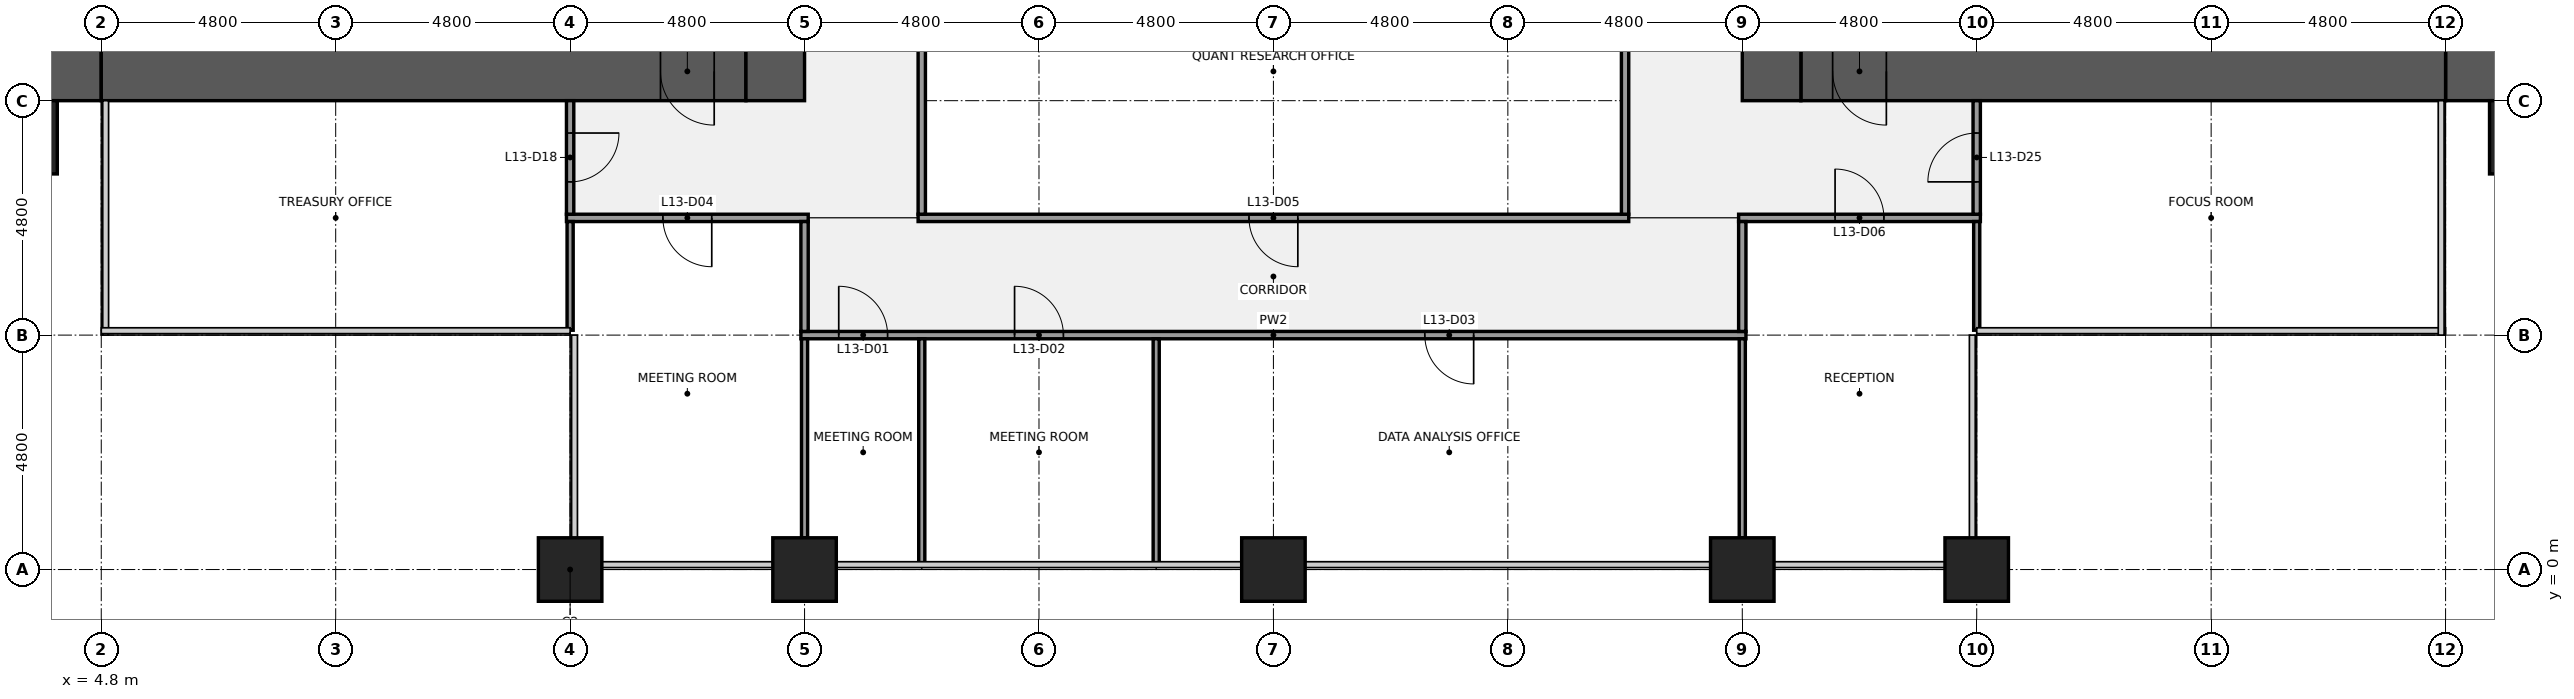
"""IFC4 building model, lengths in metres.
Left out: names, types, materials, properties, quantities, classifications, styles, units other than length and angle.
Written with IfcOpenShell. Run it as: python <this file> out.ifc"""

import sys

from ifc_helpers import new_model, si_unit, direction, frame, frame_2d, origin, origin_2d, place, context, subcontext, project, spatial, rectangle, extrude, element, fill, save


model = new_model("IFC4")
c1 = context("Model", 3, precision=1e-05, world=origin(), true_north=direction((0.0, 1.0)))
c2 = subcontext(c1, "Body", "Model", "MODEL_VIEW")
j1 = project(units=[si_unit("LENGTHUNIT", "METRE"), si_unit("PLANEANGLEUNIT", "RADIAN")], contexts=[c1])
p1 = place(None, origin())
s1 = spatial("IfcSite", under=j1, at=p1, CompositionType="ELEMENT")
p2 = place(p1, origin())
s2 = spatial("IfcBuilding", under=s1, at=p2, CompositionType="ELEMENT")
p3 = place(p2, frame((0.0, 0.0, 63.0)))
s3 = spatial("IfcBuildingStorey", under=s2, at=p3, CompositionType="ELEMENT", Elevation=63.0)
for number, where, z_axis, x_axis in (
    (1, (14.4, 0.0, 0.0), (0.0, 0.0, 1.0), (1.0, 0.0, 0.0)),
    (2, (19.2, 0.0, 0.0), (0.0, 0.0, 1.0), (1.0, 0.0, 0.0)),
    (3, (28.8, 0.0, 0.0), (0.0, 0.0, 1.0), (1.0, 0.0, 0.0)),
    (4, (38.4, 0.0, 0.0), (0.0, 0.0, 1.0), (1.0, 0.0, 0.0)),
    (5, (43.2, 0.0, 0.0), (0.0, 0.0, 1.0), (1.0, 0.0, 0.0)),
):
    element("IfcColumn", number, at=place(p3, frame(where, z_axis=z_axis, x_axis=x_axis)), inside=s3, PredefinedType="COLUMN", context=c2, shape_type="SweptSolid", body=[
        extrude(rectangle(XDim=1.3, YDim=1.3, at=origin_2d()), origin(), (0.0, 0.0, 1.0), 4.0),
    ])
p4 = place(p3, frame((4.8, 10.2, 0.0), z_axis=(0.0, 0.0, 1.0), x_axis=(-1.0, 0.0, 0.0)))
e6 = element("IfcWall", 6, at=p4, inside=s3, PredefinedType="SHEAR", context=c2, shape_type="SweptSolid", body=[
    extrude(rectangle(XDim=3.6, YDim=1.2, at=frame_2d((1.8, 0.0))), origin(), (0.0, 0.0, 1.0), 3.84),
])
p5 = place(p3, frame((18.0, 10.2, 0.0), z_axis=(0.0, 0.0, 1.0), x_axis=(-1.0, 0.0, 0.0)))
e7 = element("IfcWall", 7, at=p5, inside=s3, PredefinedType="SHEAR", context=c2, shape_type="SweptSolid", body=[
    extrude(rectangle(XDim=13.2, YDim=1.2, at=frame_2d((6.6, 0.0))), origin(), (0.0, 0.0, 1.0), 3.84),
])
p6 = place(p5, frame((0.65, 0.0, 0.0)))
e8 = element("IfcOpeningElement", 8, at=p6, cuts=e7, PredefinedType="OPENING", context=c2, shape_type="SweptSolid", body=[
    extrude(rectangle(XDim=1.1, YDim=2.1, at=frame_2d((0.55, 1.05))), frame((0.0, 0.61, 0.0), z_axis=(0.0, -1.0, 0.0), x_axis=(1.0, 0.0, 0.0)), (0.0, 0.0, 1.0), 1.22),
])
p7 = place(p3, frame((18.6, 38.4, 0.0), z_axis=(0.0, 0.0, 1.0), x_axis=(0.0, -1.0, 0.0)))
e9 = element("IfcWall", 9, at=p7, inside=s3, PredefinedType="SHEAR", context=c2, shape_type="SweptSolid", body=[
    extrude(rectangle(XDim=28.8, YDim=1.2, at=frame_2d((14.4, 0.0))), origin(), (0.0, 0.0, 1.0), 3.84),
])
p8 = place(p7, frame((18.3, 0.0, 0.0)))
e10 = element("IfcOpeningElement", 10, at=p8, cuts=e9, PredefinedType="OPENING", context=c2, shape_type="SweptSolid", body=[
    extrude(rectangle(XDim=1.8, YDim=2.1, at=frame_2d((0.9, 1.05))), frame((0.0, 0.61, 0.0), z_axis=(0.0, -1.0, 0.0), x_axis=(1.0, 0.0, 0.0)), (0.0, 0.0, 1.0), 1.22),
])
p9 = place(p7, frame((8.7, 0.0, 0.0)))
e11 = element("IfcOpeningElement", 11, at=p9, cuts=e9, PredefinedType="OPENING", context=c2, shape_type="SweptSolid", body=[
    extrude(rectangle(XDim=1.8, YDim=2.1, at=frame_2d((0.9, 1.05))), frame((0.0, 0.61, 0.0), z_axis=(0.0, -1.0, 0.0), x_axis=(1.0, 0.0, 0.0)), (0.0, 0.0, 1.0), 1.22),
])
p10 = place(p3, frame((56.4, 10.2, 0.0), z_axis=(0.0, 0.0, 1.0), x_axis=(-1.0, 0.0, 0.0)))
e12 = element("IfcWall", 12, at=p10, inside=s3, PredefinedType="SHEAR", context=c2, shape_type="SweptSolid", body=[
    extrude(rectangle(XDim=3.6, YDim=1.2, at=frame_2d((1.8, 0.0))), origin(), (0.0, 0.0, 1.0), 3.84),
])
p11 = place(p3, frame((52.8, 10.2, 0.0), z_axis=(0.0, 0.0, 1.0), x_axis=(-1.0, 0.0, 0.0)))
e13 = element("IfcWall", 13, at=p11, inside=s3, PredefinedType="SHEAR", context=c2, shape_type="SweptSolid", body=[
    extrude(rectangle(XDim=13.2, YDim=1.2, at=frame_2d((6.6, 0.0))), origin(), (0.0, 0.0, 1.0), 3.84),
])
p12 = place(p11, frame((11.45, 0.0, 0.0)))
e14 = element("IfcOpeningElement", 14, at=p12, cuts=e13, PredefinedType="OPENING", context=c2, shape_type="SweptSolid", body=[
    extrude(rectangle(XDim=1.1, YDim=2.1, at=frame_2d((0.55, 1.05))), frame((0.0, 0.61, 0.0), z_axis=(0.0, -1.0, 0.0), x_axis=(1.0, 0.0, 0.0)), (0.0, 0.0, 1.0), 1.22),
])
p13 = place(p3, frame((39.0, 9.6, 0.0), z_axis=(0.0, 0.0, 1.0), x_axis=(0.0, 1.0, 0.0)))
e15 = element("IfcWall", 15, at=p13, inside=s3, PredefinedType="SHEAR", context=c2, shape_type="SweptSolid", body=[
    extrude(rectangle(XDim=28.8, YDim=1.2, at=frame_2d((14.4, 0.0))), origin(), (0.0, 0.0, 1.0), 3.84),
])
p14 = place(p13, frame((8.7, 0.0, 0.0)))
e16 = element("IfcOpeningElement", 16, at=p14, cuts=e15, PredefinedType="OPENING", context=c2, shape_type="SweptSolid", body=[
    extrude(rectangle(XDim=1.8, YDim=2.1, at=frame_2d((0.9, 1.05))), frame((0.0, 0.61, 0.0), z_axis=(0.0, -1.0, 0.0), x_axis=(1.0, 0.0, 0.0)), (0.0, 0.0, 1.0), 1.22),
])
p15 = place(p13, frame((18.3, 0.0, 0.0)))
e17 = element("IfcOpeningElement", 17, at=p15, cuts=e15, PredefinedType="OPENING", context=c2, shape_type="SweptSolid", body=[
    extrude(rectangle(XDim=1.8, YDim=2.1, at=frame_2d((0.9, 1.05))), frame((0.0, 0.61, 0.0), z_axis=(0.0, -1.0, 0.0), x_axis=(1.0, 0.0, 0.0)), (0.0, 0.0, 1.0), 1.22),
])
p16 = place(p3, frame((19.125, 4.8, 0.0), z_axis=(0.0, 0.0, 1.0), x_axis=(1.0, 0.0, 0.0)))
e18 = element("IfcWall", 18, at=p16, inside=s3, PredefinedType="PARTITIONING", context=c2, shape_type="SweptSolid", body=[
    extrude(rectangle(XDim=19.35, YDim=0.15, at=frame_2d((9.675, 0.0))), origin(), (0.0, 0.0, 1.0), 2.87),
])
p17 = place(p16, frame((0.775, 0.0, 0.0)))
e19 = element("IfcOpeningElement", 19, at=p17, cuts=e18, PredefinedType="OPENING", context=c2, shape_type="SweptSolid", body=[
    extrude(rectangle(XDim=1.0, YDim=2.1, at=frame_2d((0.5, 1.05))), frame((0.0, 0.085, 0.0), z_axis=(0.0, -1.0, 0.0), x_axis=(1.0, 0.0, 0.0)), (0.0, 0.0, 1.0), 0.17),
])
p18 = place(p16, frame((4.375, 0.0, 0.0)))
e20 = element("IfcOpeningElement", 20, at=p18, cuts=e18, PredefinedType="OPENING", context=c2, shape_type="SweptSolid", body=[
    extrude(rectangle(XDim=1.0, YDim=2.1, at=frame_2d((0.5, 1.05))), frame((0.0, 0.085, 0.0), z_axis=(0.0, -1.0, 0.0), x_axis=(1.0, 0.0, 0.0)), (0.0, 0.0, 1.0), 0.17),
])
p19 = place(p16, frame((12.775, 0.0, 0.0)))
e21 = element("IfcOpeningElement", 21, at=p19, cuts=e18, PredefinedType="OPENING", context=c2, shape_type="SweptSolid", body=[
    extrude(rectangle(XDim=1.0, YDim=2.1, at=frame_2d((0.5, 1.05))), frame((0.0, 0.085, 0.0), z_axis=(0.0, -1.0, 0.0), x_axis=(1.0, 0.0, 0.0)), (0.0, 0.0, 1.0), 0.17),
])
p20 = place(p3, frame((14.325, 7.2, 0.0), z_axis=(0.0, 0.0, 1.0), x_axis=(1.0, 0.0, 0.0)))
e22 = element("IfcWall", 22, at=p20, inside=s3, PredefinedType="PARTITIONING", context=c2, shape_type="SweptSolid", body=[
    extrude(rectangle(XDim=4.95, YDim=0.15, at=frame_2d((2.475, 0.0))), origin(), (0.0, 0.0, 1.0), 2.87),
])
p21 = place(p20, frame((1.975, 0.0, 0.0)))
e23 = element("IfcOpeningElement", 23, at=p21, cuts=e22, PredefinedType="OPENING", context=c2, shape_type="SweptSolid", body=[
    extrude(rectangle(XDim=1.0, YDim=2.1, at=frame_2d((0.5, 1.05))), frame((0.0, 0.085, 0.0), z_axis=(0.0, -1.0, 0.0), x_axis=(1.0, 0.0, 0.0)), (0.0, 0.0, 1.0), 0.17),
])
p22 = place(p3, frame((21.525, 7.2, 0.0), z_axis=(0.0, 0.0, 1.0), x_axis=(1.0, 0.0, 0.0)))
e24 = element("IfcWall", 24, at=p22, inside=s3, PredefinedType="PARTITIONING", context=c2, shape_type="SweptSolid", body=[
    extrude(rectangle(XDim=14.55, YDim=0.15, at=frame_2d((7.275, 0.0))), origin(), (0.0, 0.0, 1.0), 2.87),
])
p23 = place(p22, frame((6.775, 0.0, 0.0)))
e25 = element("IfcOpeningElement", 25, at=p23, cuts=e24, PredefinedType="OPENING", context=c2, shape_type="SweptSolid", body=[
    extrude(rectangle(XDim=1.0, YDim=2.1, at=frame_2d((0.5, 1.05))), frame((0.0, 0.085, 0.0), z_axis=(0.0, -1.0, 0.0), x_axis=(1.0, 0.0, 0.0)), (0.0, 0.0, 1.0), 0.17),
])
p24 = place(p3, frame((38.325, 7.2, 0.0), z_axis=(0.0, 0.0, 1.0), x_axis=(1.0, 0.0, 0.0)))
e26 = element("IfcWall", 26, at=p24, inside=s3, PredefinedType="PARTITIONING", context=c2, shape_type="SweptSolid", body=[
    extrude(rectangle(XDim=4.95, YDim=0.15, at=frame_2d((2.475, 0.0))), origin(), (0.0, 0.0, 1.0), 2.87),
])
p25 = place(p24, frame((1.975, 0.0, 0.0)))
e27 = element("IfcOpeningElement", 27, at=p25, cuts=e26, PredefinedType="OPENING", context=c2, shape_type="SweptSolid", body=[
    extrude(rectangle(XDim=1.0, YDim=2.1, at=frame_2d((0.5, 1.05))), frame((0.0, 0.085, 0.0), z_axis=(0.0, -1.0, 0.0), x_axis=(1.0, 0.0, 0.0)), (0.0, 0.0, 1.0), 0.17),
])
p26 = place(p3, frame((14.4, 4.9, 0.0), z_axis=(0.0, 0.0, 1.0), x_axis=(0.0, 1.0, 0.0)))
e28 = element("IfcWall", 28, at=p26, inside=s3, PredefinedType="PARTITIONING", context=c2, shape_type="SweptSolid", body=[
    extrude(rectangle(XDim=2.225, YDim=0.125, at=frame_2d((1.113, 0.0))), origin(), (0.0, 0.0, 1.0), 2.87),
])
p27 = place(p3, frame((14.4, 7.275, 0.0), z_axis=(0.0, 0.0, 1.0), x_axis=(0.0, 1.0, 0.0)))
e29 = element("IfcWall", 29, at=p27, inside=s3, PredefinedType="PARTITIONING", context=c2, shape_type="SweptSolid", body=[
    extrude(rectangle(XDim=2.325, YDim=0.15, at=frame_2d((1.163, 0.0))), origin(), (0.0, 0.0, 1.0), 2.87),
])
p28 = place(p27, frame((0.663, 0.0, 0.0)))
e30 = element("IfcOpeningElement", 30, at=p28, cuts=e29, PredefinedType="OPENING", context=c2, shape_type="SweptSolid", body=[
    extrude(rectangle(XDim=1.0, YDim=2.1, at=frame_2d((0.5, 1.05))), frame((0.0, 0.085, 0.0), z_axis=(0.0, -1.0, 0.0), x_axis=(1.0, 0.0, 0.0)), (0.0, 0.0, 1.0), 0.17),
])
p29 = place(p3, frame((19.2, 0.65, 0.0), z_axis=(0.0, 0.0, 1.0), x_axis=(0.0, 1.0, 0.0)))
e31 = element("IfcWall", 31, at=p29, inside=s3, PredefinedType="PARTITIONING", context=c2, shape_type="SweptSolid", body=[
    extrude(rectangle(XDim=4.075, YDim=0.125, at=frame_2d((2.038, 0.0))), origin(), (0.0, 0.0, 1.0), 2.87),
])
p30 = place(p3, frame((19.2, 4.875, 0.0), z_axis=(0.0, 0.0, 1.0), x_axis=(0.0, 1.0, 0.0)))
e32 = element("IfcWall", 32, at=p30, inside=s3, PredefinedType="PARTITIONING", context=c2, shape_type="SweptSolid", body=[
    extrude(rectangle(XDim=2.25, YDim=0.15, at=frame_2d((1.125, 0.0))), origin(), (0.0, 0.0, 1.0), 2.87),
])
p31 = place(p3, frame((21.6, 0.1, 0.0), z_axis=(0.0, 0.0, 1.0), x_axis=(0.0, 1.0, 0.0)))
e33 = element("IfcWall", 33, at=p31, inside=s3, PredefinedType="PARTITIONING", context=c2, shape_type="SweptSolid", body=[
    extrude(rectangle(XDim=4.625, YDim=0.125, at=frame_2d((2.312, 0.0))), origin(), (0.0, 0.0, 1.0), 2.87),
])
p32 = place(p3, frame((21.6, 7.275, 0.0), z_axis=(0.0, 0.0, 1.0), x_axis=(0.0, 1.0, 0.0)))
e34 = element("IfcWall", 34, at=p32, inside=s3, PredefinedType="PARTITIONING", context=c2, shape_type="SweptSolid", body=[
    extrude(rectangle(XDim=5.863, YDim=0.15, at=frame_2d((2.931, 0.0))), origin(), (0.0, 0.0, 1.0), 2.87),
])
p33 = place(p3, frame((26.4, 0.1, 0.0), z_axis=(0.0, 0.0, 1.0), x_axis=(0.0, 1.0, 0.0)))
e35 = element("IfcWall", 35, at=p33, inside=s3, PredefinedType="PARTITIONING", context=c2, shape_type="SweptSolid", body=[
    extrude(rectangle(XDim=4.625, YDim=0.125, at=frame_2d((2.312, 0.0))), origin(), (0.0, 0.0, 1.0), 2.87),
])
p34 = place(p3, frame((36.0, 7.275, 0.0), z_axis=(0.0, 0.0, 1.0), x_axis=(0.0, 1.0, 0.0)))
e36 = element("IfcWall", 36, at=p34, inside=s3, PredefinedType="PARTITIONING", context=c2, shape_type="SweptSolid", body=[
    extrude(rectangle(XDim=5.863, YDim=0.15, at=frame_2d((2.931, 0.0))), origin(), (0.0, 0.0, 1.0), 2.87),
])
p35 = place(p3, frame((38.4, 0.65, 0.0), z_axis=(0.0, 0.0, 1.0), x_axis=(0.0, 1.0, 0.0)))
e37 = element("IfcWall", 37, at=p35, inside=s3, PredefinedType="PARTITIONING", context=c2, shape_type="SweptSolid", body=[
    extrude(rectangle(XDim=4.075, YDim=0.125, at=frame_2d((2.038, 0.0))), origin(), (0.0, 0.0, 1.0), 2.87),
])
p36 = place(p3, frame((38.4, 4.875, 0.0), z_axis=(0.0, 0.0, 1.0), x_axis=(0.0, 1.0, 0.0)))
e38 = element("IfcWall", 38, at=p36, inside=s3, PredefinedType="PARTITIONING", context=c2, shape_type="SweptSolid", body=[
    extrude(rectangle(XDim=2.25, YDim=0.15, at=frame_2d((1.125, 0.0))), origin(), (0.0, 0.0, 1.0), 2.87),
])
p37 = place(p3, frame((43.2, 4.9, 0.0), z_axis=(0.0, 0.0, 1.0), x_axis=(0.0, 1.0, 0.0)))
e39 = element("IfcWall", 39, at=p37, inside=s3, PredefinedType="PARTITIONING", context=c2, shape_type="SweptSolid", body=[
    extrude(rectangle(XDim=2.225, YDim=0.125, at=frame_2d((1.113, 0.0))), origin(), (0.0, 0.0, 1.0), 2.87),
])
p38 = place(p3, frame((43.2, 7.275, 0.0), z_axis=(0.0, 0.0, 1.0), x_axis=(0.0, 1.0, 0.0)))
e40 = element("IfcWall", 40, at=p38, inside=s3, PredefinedType="PARTITIONING", context=c2, shape_type="SweptSolid", body=[
    extrude(rectangle(XDim=2.325, YDim=0.15, at=frame_2d((1.163, 0.0))), origin(), (0.0, 0.0, 1.0), 2.87),
])
p39 = place(p38, frame((0.663, 0.0, 0.0)))
e41 = element("IfcOpeningElement", 41, at=p39, cuts=e40, PredefinedType="OPENING", context=c2, shape_type="SweptSolid", body=[
    extrude(rectangle(XDim=1.0, YDim=2.1, at=frame_2d((0.5, 1.05))), frame((0.0, 0.085, 0.0), z_axis=(0.0, -1.0, 0.0), x_axis=(1.0, 0.0, 0.0)), (0.0, 0.0, 1.0), 0.17),
])
for number, where, z_axis, x_axis in (
    (42, (55.2, 8.85, 0.0), (0.0, 0.0, 1.0), (1.0, 0.0, 0.0)),
    (43, (2.4, 8.85, 0.0), (0.0, 0.0, 1.0), (1.0, 0.0, 0.0)),
):
    element("IfcColumn", number, at=place(p3, frame(where, z_axis=z_axis, x_axis=x_axis)), inside=s3, PredefinedType="PILASTER", context=c2, shape_type="SweptSolid", body=[
        extrude(rectangle(XDim=3.0, YDim=1.5, at=origin_2d()), origin(), (0.0, 0.0, 1.0), 4.0),
    ])
for number, where, z_axis, x_axis in (
    (44, (14.4, -1.075, 0.0), (0.0, 0.0, 1.0), (1.0, 0.0, 0.0)),
    (45, (19.2, -1.075, 0.0), (0.0, 0.0, 1.0), (1.0, 0.0, 0.0)),
    (46, (38.4, -1.075, 0.0), (0.0, 0.0, 1.0), (1.0, 0.0, 0.0)),
    (47, (43.2, -1.075, 0.0), (0.0, 0.0, 1.0), (1.0, 0.0, 0.0)),
):
    element("IfcColumn", number, at=place(p3, frame(where, z_axis=z_axis, x_axis=x_axis)), inside=s3, PredefinedType="PILASTER", context=c2, shape_type="SweptSolid", body=[
        extrude(rectangle(XDim=4.2, YDim=0.85, at=origin_2d()), origin(), (0.0, 0.0, 1.0), 4.0),
    ])
p40 = place(p6, origin())
e48 = element("IfcDoor", 48, at=p40, inside=s3, OperationType="SINGLE_SWING_LEFT", PredefinedType="DOOR", context=c2, shape_type="SweptSolid", body=[
    extrude(rectangle(XDim=1.1, YDim=2.1, at=frame_2d((0.55, 1.05))), frame((0.0, 0.025, 0.0), z_axis=(0.0, -1.0, 0.0), x_axis=(1.0, 0.0, 0.0)), (0.0, 0.0, 1.0), 0.05),
])
fill(e8, e48)
p41 = place(p12, origin())
e49 = element("IfcDoor", 49, at=p41, inside=s3, OperationType="SINGLE_SWING_LEFT", PredefinedType="DOOR", context=c2, shape_type="SweptSolid", body=[
    extrude(rectangle(XDim=1.1, YDim=2.1, at=frame_2d((0.55, 1.05))), frame((0.0, 0.025, 0.0), z_axis=(0.0, -1.0, 0.0), x_axis=(1.0, 0.0, 0.0)), (0.0, 0.0, 1.0), 0.05),
])
fill(e14, e49)
p42 = place(p17, origin())
e50 = element("IfcDoor", 50, at=p42, inside=s3, OperationType="SINGLE_SWING_LEFT", PredefinedType="DOOR", context=c2, shape_type="SweptSolid", body=[
    extrude(rectangle(XDim=1.0, YDim=2.1, at=frame_2d((0.5, 1.05))), frame((0.0, 0.025, 0.0), z_axis=(0.0, -1.0, 0.0), x_axis=(1.0, 0.0, 0.0)), (0.0, 0.0, 1.0), 0.05),
])
fill(e19, e50)
p43 = place(p18, origin())
e51 = element("IfcDoor", 51, at=p43, inside=s3, OperationType="SINGLE_SWING_LEFT", PredefinedType="DOOR", context=c2, shape_type="SweptSolid", body=[
    extrude(rectangle(XDim=1.0, YDim=2.1, at=frame_2d((0.5, 1.05))), frame((0.0, 0.025, 0.0), z_axis=(0.0, -1.0, 0.0), x_axis=(1.0, 0.0, 0.0)), (0.0, 0.0, 1.0), 0.05),
])
fill(e20, e51)
p44 = place(p19, origin())
e52 = element("IfcDoor", 52, at=p44, inside=s3, OperationType="SINGLE_SWING_RIGHT", PredefinedType="DOOR", context=c2, shape_type="SweptSolid", body=[
    extrude(rectangle(XDim=1.0, YDim=2.1, at=frame_2d((0.5, 1.05))), frame((0.0, 0.025, 0.0), z_axis=(0.0, -1.0, 0.0), x_axis=(1.0, 0.0, 0.0)), (0.0, 0.0, 1.0), 0.05),
])
fill(e21, e52)
p45 = place(p21, origin())
e53 = element("IfcDoor", 53, at=p45, inside=s3, OperationType="SINGLE_SWING_RIGHT", PredefinedType="DOOR", context=c2, shape_type="SweptSolid", body=[
    extrude(rectangle(XDim=1.0, YDim=2.1, at=frame_2d((0.5, 1.05))), frame((0.0, 0.025, 0.0), z_axis=(0.0, -1.0, 0.0), x_axis=(1.0, 0.0, 0.0)), (0.0, 0.0, 1.0), 0.05),
])
fill(e23, e53)
p46 = place(p23, origin())
e54 = element("IfcDoor", 54, at=p46, inside=s3, OperationType="SINGLE_SWING_RIGHT", PredefinedType="DOOR", context=c2, shape_type="SweptSolid", body=[
    extrude(rectangle(XDim=1.0, YDim=2.1, at=frame_2d((0.5, 1.05))), frame((0.0, 0.025, 0.0), z_axis=(0.0, -1.0, 0.0), x_axis=(1.0, 0.0, 0.0)), (0.0, 0.0, 1.0), 0.05),
])
fill(e25, e54)
p47 = place(p25, origin())
e55 = element("IfcDoor", 55, at=p47, inside=s3, OperationType="SINGLE_SWING_LEFT", PredefinedType="DOOR", context=c2, shape_type="SweptSolid", body=[
    extrude(rectangle(XDim=1.0, YDim=2.1, at=frame_2d((0.5, 1.05))), frame((0.0, 0.025, 0.0), z_axis=(0.0, -1.0, 0.0), x_axis=(1.0, 0.0, 0.0)), (0.0, 0.0, 1.0), 0.05),
])
fill(e27, e55)
p48 = place(p28, origin())
e56 = element("IfcDoor", 56, at=p48, inside=s3, OperationType="SINGLE_SWING_RIGHT", PredefinedType="DOOR", context=c2, shape_type="SweptSolid", body=[
    extrude(rectangle(XDim=1.0, YDim=2.1, at=frame_2d((0.5, 1.05))), frame((0.0, 0.025, 0.0), z_axis=(0.0, -1.0, 0.0), x_axis=(1.0, 0.0, 0.0)), (0.0, 0.0, 1.0), 0.05),
])
fill(e30, e56)
p49 = place(p39, origin())
e57 = element("IfcDoor", 57, at=p49, inside=s3, OperationType="SINGLE_SWING_LEFT", PredefinedType="DOOR", context=c2, shape_type="SweptSolid", body=[
    extrude(rectangle(XDim=1.0, YDim=2.1, at=frame_2d((0.5, 1.05))), frame((0.0, 0.025, 0.0), z_axis=(0.0, -1.0, 0.0), x_axis=(1.0, 0.0, 0.0)), (0.0, 0.0, 1.0), 0.05),
])
fill(e41, e57)
save(model, sys.argv[1])
